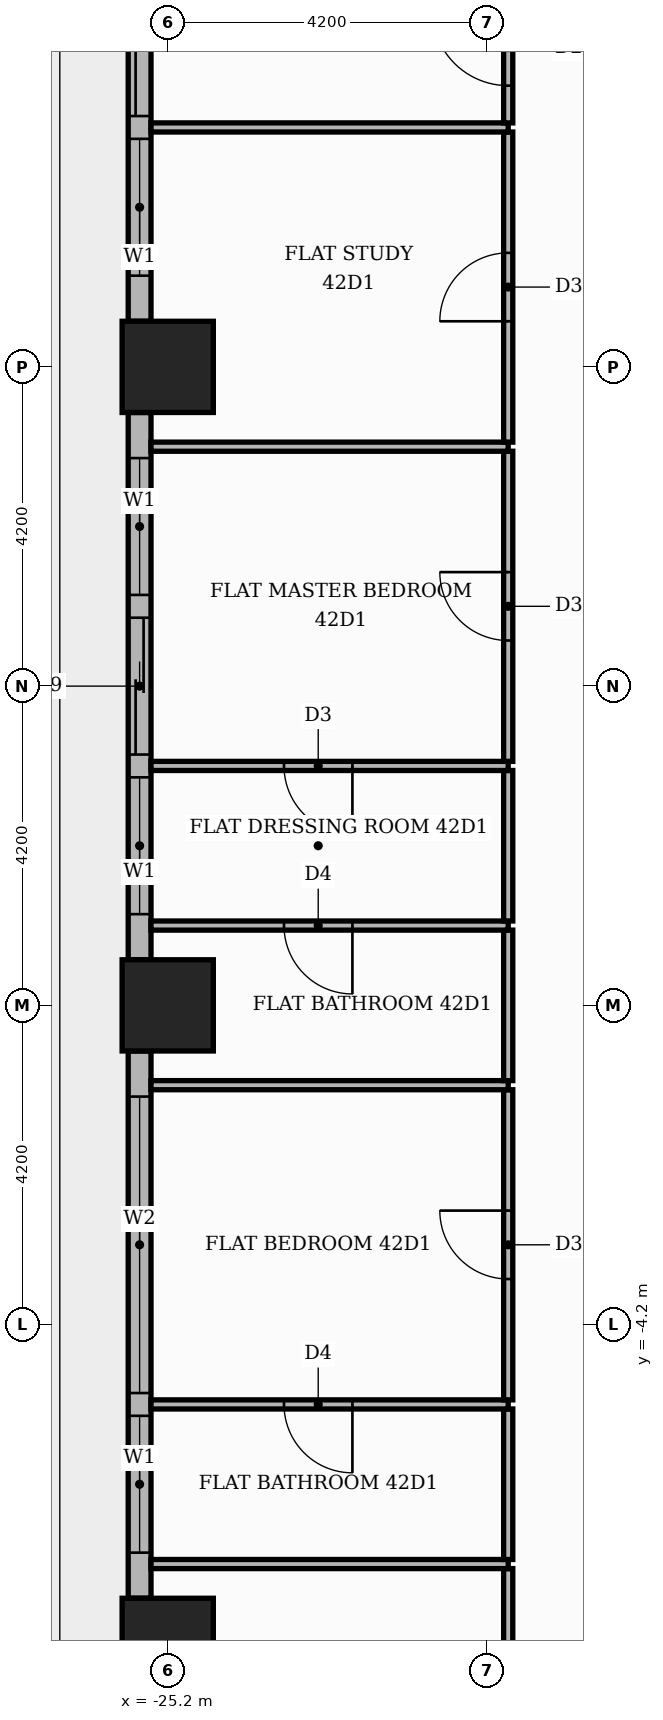
"""IFC4 building model, lengths in metres.
Left out: names, types, materials, properties, quantities, classifications, styles, units other than length and angle.
Written with IfcOpenShell. Run it as: python <this file> out.ifc"""

import sys

from ifc_helpers import new_model, si_unit, direction, frame, frame_2d, origin, origin_2d, place, context, subcontext, project, spatial, rectangle, extrude, element, fill, save


model = new_model("IFC4")
c1 = context("Model", 3, precision=1e-05, world=origin(), true_north=direction((0.0, 1.0)))
c2 = subcontext(c1, "Body", "Model", "MODEL_VIEW")
j1 = project(units=[si_unit("LENGTHUNIT", "METRE"), si_unit("PLANEANGLEUNIT", "RADIAN")], contexts=[c1])
p1 = place(None, origin())
s1 = spatial("IfcSite", under=j1, at=p1, CompositionType="ELEMENT")
p2 = place(p1, origin())
s2 = spatial("IfcBuilding", under=s1, at=p2, CompositionType="ELEMENT")
p3 = place(p2, frame((0.0, 0.0, 176.7)))
s3 = spatial("IfcBuildingStorey", under=s2, at=p3, CompositionType="ELEMENT", Elevation=176.7)
for number, where, z_axis, x_axis in (
    (1, (-25.2, 0.0, 0.0), (0.0, 0.0, 1.0), (1.0, 0.0, 0.0)),
    (2, (-25.2, -8.4, 0.0), (0.0, 0.0, 1.0), (1.0, 0.0, 0.0)),
    (3, (-25.2, 8.4, 0.0), (0.0, 0.0, 1.0), (1.0, 0.0, 0.0)),
):
    element("IfcColumn", number, at=place(p3, frame(where, z_axis=z_axis, x_axis=x_axis)), inside=s3, PredefinedType="COLUMN", context=c2, shape_type="SweptSolid", body=[
        extrude(rectangle(XDim=1.2, YDim=1.2, at=origin_2d()), origin(), (0.0, 0.0, 1.0), 3.9),
    ])
p4 = place(p3, frame((-25.57, 16.2, 0.0), z_axis=(0.0, 0.0, 1.0), x_axis=(0.0, -1.0, 0.0)))
e4 = element("IfcWall", 4, at=p4, inside=s3, PredefinedType="STANDARD", context=c2, shape_type="SweptSolid", body=[
    extrude(rectangle(XDim=7.2, YDim=0.3, at=frame_2d((3.6, 0.0))), origin(), (0.0, 0.0, 1.0), 3.4),
])
p5 = place(p4, frame((0.6, 0.0, 0.0)))
e5 = element("IfcOpeningElement", 5, at=p5, cuts=e4, PredefinedType="OPENING", context=c2, shape_type="SweptSolid", body=[
    extrude(rectangle(XDim=3.9, YDim=2.4, at=frame_2d((1.95, 1.2))), frame((0.0, 0.16, 0.0), z_axis=(0.0, -1.0, 0.0), x_axis=(1.0, 0.0, 0.0)), (0.0, 0.0, 1.0), 0.32),
])
p6 = place(p4, frame((4.8, 0.0, 0.9)))
e6 = element("IfcOpeningElement", 6, at=p6, cuts=e4, PredefinedType="OPENING", context=c2, shape_type="SweptSolid", body=[
    extrude(rectangle(XDim=1.8, YDim=2.1, at=frame_2d((0.9, 1.05))), frame((0.0, 0.16, 0.0), z_axis=(0.0, -1.0, 0.0), x_axis=(1.0, 0.0, 0.0)), (0.0, 0.0, 1.0), 0.32),
])
p7 = place(p3, frame((-25.57, 7.8, 0.0), z_axis=(0.0, 0.0, 1.0), x_axis=(0.0, -1.0, 0.0)))
e7 = element("IfcWall", 7, at=p7, inside=s3, PredefinedType="STANDARD", context=c2, shape_type="SweptSolid", body=[
    extrude(rectangle(XDim=7.2, YDim=0.3, at=frame_2d((3.6, 0.0))), origin(), (0.0, 0.0, 1.0), 3.4),
])
p8 = place(p7, frame((0.6, 0.0, 0.9)))
e8 = element("IfcOpeningElement", 8, at=p8, cuts=e7, PredefinedType="OPENING", context=c2, shape_type="SweptSolid", body=[
    extrude(rectangle(XDim=1.8, YDim=2.1, at=frame_2d((0.9, 1.05))), frame((0.0, 0.16, 0.0), z_axis=(0.0, -1.0, 0.0), x_axis=(1.0, 0.0, 0.0)), (0.0, 0.0, 1.0), 0.32),
])
p9 = place(p7, frame((2.7, 0.0, 0.0)))
e9 = element("IfcOpeningElement", 9, at=p9, cuts=e7, PredefinedType="OPENING", context=c2, shape_type="SweptSolid", body=[
    extrude(rectangle(XDim=1.8, YDim=2.4, at=frame_2d((0.9, 1.2))), frame((0.0, 0.16, 0.0), z_axis=(0.0, -1.0, 0.0), x_axis=(1.0, 0.0, 0.0)), (0.0, 0.0, 1.0), 0.32),
])
p10 = place(p7, frame((4.8, 0.0, 0.9)))
e10 = element("IfcOpeningElement", 10, at=p10, cuts=e7, PredefinedType="OPENING", context=c2, shape_type="SweptSolid", body=[
    extrude(rectangle(XDim=1.8, YDim=2.1, at=frame_2d((0.9, 1.05))), frame((0.0, 0.16, 0.0), z_axis=(0.0, -1.0, 0.0), x_axis=(1.0, 0.0, 0.0)), (0.0, 0.0, 1.0), 0.32),
])
p11 = place(p3, frame((-25.57, -0.6, 0.0), z_axis=(0.0, 0.0, 1.0), x_axis=(0.0, -1.0, 0.0)))
e11 = element("IfcWall", 11, at=p11, inside=s3, PredefinedType="STANDARD", context=c2, shape_type="SweptSolid", body=[
    extrude(rectangle(XDim=7.2, YDim=0.3, at=frame_2d((3.6, 0.0))), origin(), (0.0, 0.0, 1.0), 3.4),
])
p12 = place(p11, frame((0.6, 0.0, 0.9)))
e12 = element("IfcOpeningElement", 12, at=p12, cuts=e11, PredefinedType="OPENING", context=c2, shape_type="SweptSolid", body=[
    extrude(rectangle(XDim=3.9, YDim=2.1, at=frame_2d((1.95, 1.05))), frame((0.0, 0.16, 0.0), z_axis=(0.0, -1.0, 0.0), x_axis=(1.0, 0.0, 0.0)), (0.0, 0.0, 1.0), 0.32),
])
p13 = place(p11, frame((4.8, 0.0, 0.9)))
e13 = element("IfcOpeningElement", 13, at=p13, cuts=e11, PredefinedType="OPENING", context=c2, shape_type="SweptSolid", body=[
    extrude(rectangle(XDim=1.8, YDim=2.1, at=frame_2d((0.9, 1.05))), frame((0.0, 0.16, 0.0), z_axis=(0.0, -1.0, 0.0), x_axis=(1.0, 0.0, 0.0)), (0.0, 0.0, 1.0), 0.32),
])
p14 = place(p3, frame((-20.72, -11.49, 0.0), z_axis=(0.0, 0.0, 1.0), x_axis=(0.0, 1.0, 0.0)))
e14 = element("IfcWall", 14, at=p14, inside=s3, PredefinedType="PARTITIONING", context=c2, shape_type="SweptSolid", body=[
    extrude(rectangle(XDim=4.08, YDim=0.12, at=frame_2d((2.04, 0.0))), origin(), (0.0, 0.0, 1.0), 3.4),
])
p15 = place(p14, frame((1.59, 0.0, 0.0)))
e15 = element("IfcOpeningElement", 15, at=p15, cuts=e14, PredefinedType="OPENING", context=c2, shape_type="SweptSolid", body=[
    extrude(rectangle(XDim=0.9, YDim=2.1, at=frame_2d((0.45, 1.05))), frame((0.0, 0.07, 0.0), z_axis=(0.0, -1.0, 0.0), x_axis=(1.0, 0.0, 0.0)), (0.0, 0.0, 1.0), 0.14),
])
p16 = place(p3, frame((-25.42, -7.35, 0.0), z_axis=(0.0, 0.0, 1.0), x_axis=(1.0, 0.0, 0.0)))
e16 = element("IfcWall", 16, at=p16, inside=s3, PredefinedType="PARTITIONING", context=c2, shape_type="SweptSolid", body=[
    extrude(rectangle(XDim=4.7, YDim=0.12, at=frame_2d((2.35, 0.0))), origin(), (0.0, 0.0, 1.0), 3.4),
])
p17 = place(p3, frame((-20.72, -7.29, 0.0), z_axis=(0.0, 0.0, 1.0), x_axis=(0.0, 1.0, 0.0)))
e17 = element("IfcWall", 17, at=p17, inside=s3, PredefinedType="PARTITIONING", context=c2, shape_type="SweptSolid", body=[
    extrude(rectangle(XDim=1.98, YDim=0.12, at=frame_2d((0.99, 0.0))), origin(), (0.0, 0.0, 1.0), 3.4),
])
p18 = place(p3, frame((-25.42, -5.25, 0.0), z_axis=(0.0, 0.0, 1.0), x_axis=(1.0, 0.0, 0.0)))
e18 = element("IfcWall", 18, at=p18, inside=s3, PredefinedType="PARTITIONING", context=c2, shape_type="SweptSolid", body=[
    extrude(rectangle(XDim=4.7, YDim=0.12, at=frame_2d((2.35, 0.0))), origin(), (0.0, 0.0, 1.0), 3.4),
])
p19 = place(p18, frame((1.75, 0.0, 0.0)))
e19 = element("IfcOpeningElement", 19, at=p19, cuts=e18, PredefinedType="OPENING", context=c2, shape_type="SweptSolid", body=[
    extrude(rectangle(XDim=0.9, YDim=2.1, at=frame_2d((0.45, 1.05))), frame((0.0, 0.07, 0.0), z_axis=(0.0, -1.0, 0.0), x_axis=(1.0, 0.0, 0.0)), (0.0, 0.0, 1.0), 0.14),
])
p20 = place(p3, frame((-20.72, -5.19, 0.0), z_axis=(0.0, 0.0, 1.0), x_axis=(0.0, 1.0, 0.0)))
e20 = element("IfcWall", 20, at=p20, inside=s3, PredefinedType="PARTITIONING", context=c2, shape_type="SweptSolid", body=[
    extrude(rectangle(XDim=4.08, YDim=0.12, at=frame_2d((2.04, 0.0))), origin(), (0.0, 0.0, 1.0), 3.4),
])
p21 = place(p20, frame((1.59, 0.0, 0.0)))
e21 = element("IfcOpeningElement", 21, at=p21, cuts=e20, PredefinedType="OPENING", context=c2, shape_type="SweptSolid", body=[
    extrude(rectangle(XDim=0.9, YDim=2.1, at=frame_2d((0.45, 1.05))), frame((0.0, 0.07, 0.0), z_axis=(0.0, -1.0, 0.0), x_axis=(1.0, 0.0, 0.0)), (0.0, 0.0, 1.0), 0.14),
])
p22 = place(p3, frame((-25.42, -1.05, 0.0), z_axis=(0.0, 0.0, 1.0), x_axis=(1.0, 0.0, 0.0)))
e22 = element("IfcWall", 22, at=p22, inside=s3, PredefinedType="PARTITIONING", context=c2, shape_type="SweptSolid", body=[
    extrude(rectangle(XDim=4.7, YDim=0.12, at=frame_2d((2.35, 0.0))), origin(), (0.0, 0.0, 1.0), 3.4),
])
p23 = place(p3, frame((-20.72, -0.99, 0.0), z_axis=(0.0, 0.0, 1.0), x_axis=(0.0, 1.0, 0.0)))
e23 = element("IfcWall", 23, at=p23, inside=s3, PredefinedType="PARTITIONING", context=c2, shape_type="SweptSolid", body=[
    extrude(rectangle(XDim=1.98, YDim=0.12, at=frame_2d((0.99, 0.0))), origin(), (0.0, 0.0, 1.0), 3.4),
])
p24 = place(p3, frame((-25.42, 1.05, 0.0), z_axis=(0.0, 0.0, 1.0), x_axis=(1.0, 0.0, 0.0)))
e24 = element("IfcWall", 24, at=p24, inside=s3, PredefinedType="PARTITIONING", context=c2, shape_type="SweptSolid", body=[
    extrude(rectangle(XDim=4.7, YDim=0.12, at=frame_2d((2.35, 0.0))), origin(), (0.0, 0.0, 1.0), 3.4),
])
p25 = place(p24, frame((1.75, 0.0, 0.0)))
e25 = element("IfcOpeningElement", 25, at=p25, cuts=e24, PredefinedType="OPENING", context=c2, shape_type="SweptSolid", body=[
    extrude(rectangle(XDim=0.9, YDim=2.1, at=frame_2d((0.45, 1.05))), frame((0.0, 0.07, 0.0), z_axis=(0.0, -1.0, 0.0), x_axis=(1.0, 0.0, 0.0)), (0.0, 0.0, 1.0), 0.14),
])
p26 = place(p3, frame((-20.72, 1.11, 0.0), z_axis=(0.0, 0.0, 1.0), x_axis=(0.0, 1.0, 0.0)))
e26 = element("IfcWall", 26, at=p26, inside=s3, PredefinedType="PARTITIONING", context=c2, shape_type="SweptSolid", body=[
    extrude(rectangle(XDim=1.98, YDim=0.12, at=frame_2d((0.99, 0.0))), origin(), (0.0, 0.0, 1.0), 3.4),
])
p27 = place(p3, frame((-25.42, 3.15, 0.0), z_axis=(0.0, 0.0, 1.0), x_axis=(1.0, 0.0, 0.0)))
e27 = element("IfcWall", 27, at=p27, inside=s3, PredefinedType="PARTITIONING", context=c2, shape_type="SweptSolid", body=[
    extrude(rectangle(XDim=4.7, YDim=0.12, at=frame_2d((2.35, 0.0))), origin(), (0.0, 0.0, 1.0), 3.4),
])
p28 = place(p27, frame((1.75, 0.0, 0.0)))
e28 = element("IfcOpeningElement", 28, at=p28, cuts=e27, PredefinedType="OPENING", context=c2, shape_type="SweptSolid", body=[
    extrude(rectangle(XDim=0.9, YDim=2.1, at=frame_2d((0.45, 1.05))), frame((0.0, 0.07, 0.0), z_axis=(0.0, -1.0, 0.0), x_axis=(1.0, 0.0, 0.0)), (0.0, 0.0, 1.0), 0.14),
])
p29 = place(p3, frame((-20.72, 3.21, 0.0), z_axis=(0.0, 0.0, 1.0), x_axis=(0.0, 1.0, 0.0)))
e29 = element("IfcWall", 29, at=p29, inside=s3, PredefinedType="PARTITIONING", context=c2, shape_type="SweptSolid", body=[
    extrude(rectangle(XDim=4.08, YDim=0.12, at=frame_2d((2.04, 0.0))), origin(), (0.0, 0.0, 1.0), 3.4),
])
p30 = place(p29, frame((1.59, 0.0, 0.0)))
e30 = element("IfcOpeningElement", 30, at=p30, cuts=e29, PredefinedType="OPENING", context=c2, shape_type="SweptSolid", body=[
    extrude(rectangle(XDim=0.9, YDim=2.1, at=frame_2d((0.45, 1.05))), frame((0.0, 0.07, 0.0), z_axis=(0.0, -1.0, 0.0), x_axis=(1.0, 0.0, 0.0)), (0.0, 0.0, 1.0), 0.14),
])
p31 = place(p3, frame((-25.42, 7.35, 0.0), z_axis=(0.0, 0.0, 1.0), x_axis=(1.0, 0.0, 0.0)))
e31 = element("IfcWall", 31, at=p31, inside=s3, PredefinedType="PARTITIONING", context=c2, shape_type="SweptSolid", body=[
    extrude(rectangle(XDim=4.7, YDim=0.12, at=frame_2d((2.35, 0.0))), origin(), (0.0, 0.0, 1.0), 3.4),
])
p32 = place(p3, frame((-20.72, 7.41, 0.0), z_axis=(0.0, 0.0, 1.0), x_axis=(0.0, 1.0, 0.0)))
e32 = element("IfcWall", 32, at=p32, inside=s3, PredefinedType="PARTITIONING", context=c2, shape_type="SweptSolid", body=[
    extrude(rectangle(XDim=4.08, YDim=0.12, at=frame_2d((2.04, 0.0))), origin(), (0.0, 0.0, 1.0), 3.4),
])
p33 = place(p32, frame((1.59, 0.0, 0.0)))
e33 = element("IfcOpeningElement", 33, at=p33, cuts=e32, PredefinedType="OPENING", context=c2, shape_type="SweptSolid", body=[
    extrude(rectangle(XDim=0.9, YDim=2.1, at=frame_2d((0.45, 1.05))), frame((0.0, 0.07, 0.0), z_axis=(0.0, -1.0, 0.0), x_axis=(1.0, 0.0, 0.0)), (0.0, 0.0, 1.0), 0.14),
])
p34 = place(p3, frame((-25.42, 11.55, 0.0), z_axis=(0.0, 0.0, 1.0), x_axis=(1.0, 0.0, 0.0)))
e34 = element("IfcWall", 34, at=p34, inside=s3, PredefinedType="PARTITIONING", context=c2, shape_type="SweptSolid", body=[
    extrude(rectangle(XDim=4.7, YDim=0.12, at=frame_2d((2.35, 0.0))), origin(), (0.0, 0.0, 1.0), 3.4),
])
p35 = place(p3, frame((-20.72, 11.61, 0.0), z_axis=(0.0, 0.0, 1.0), x_axis=(0.0, 1.0, 0.0)))
e35 = element("IfcWall", 35, at=p35, inside=s3, PredefinedType="PARTITIONING", context=c2, shape_type="SweptSolid", body=[
    extrude(rectangle(XDim=1.98, YDim=0.12, at=frame_2d((0.99, 0.0))), origin(), (0.0, 0.0, 1.0), 3.4),
])
p36 = place(p35, frame((0.49, 0.0, 0.0)))
e36 = element("IfcOpeningElement", 36, at=p36, cuts=e35, PredefinedType="OPENING", context=c2, shape_type="SweptSolid", body=[
    extrude(rectangle(XDim=1.0, YDim=2.1, at=frame_2d((0.5, 1.05))), frame((0.0, 0.07, 0.0), z_axis=(0.0, -1.0, 0.0), x_axis=(1.0, 0.0, 0.0)), (0.0, 0.0, 1.0), 0.14),
])
p37 = place(p5, origin())
e37 = element("IfcDoor", 37, at=p37, inside=s3, OperationType="SLIDING_TO_LEFT", PredefinedType="DOOR", context=c2, shape_type="SweptSolid", body=[
    extrude(rectangle(XDim=3.9, YDim=2.4, at=frame_2d((1.95, 1.2))), frame((0.0, 0.025, 0.0), z_axis=(0.0, -1.0, 0.0), x_axis=(1.0, 0.0, 0.0)), (0.0, 0.0, 1.0), 0.05),
])
fill(e5, e37)
p38 = place(p6, origin())
e38 = element("IfcWindow", 38, at=p38, inside=s3, PartitioningType="SINGLE_PANEL", PredefinedType="WINDOW", context=c2, shape_type="SweptSolid", body=[
    extrude(rectangle(XDim=1.8, YDim=2.1, at=frame_2d((0.9, 1.05))), frame((0.0, 0.03, 0.0), z_axis=(0.0, -1.0, 0.0), x_axis=(1.0, 0.0, 0.0)), (0.0, 0.0, 1.0), 0.06),
])
fill(e6, e38)
p39 = place(p8, origin())
e39 = element("IfcWindow", 39, at=p39, inside=s3, PartitioningType="SINGLE_PANEL", PredefinedType="WINDOW", context=c2, shape_type="SweptSolid", body=[
    extrude(rectangle(XDim=1.8, YDim=2.1, at=frame_2d((0.9, 1.05))), frame((0.0, 0.03, 0.0), z_axis=(0.0, -1.0, 0.0), x_axis=(1.0, 0.0, 0.0)), (0.0, 0.0, 1.0), 0.06),
])
fill(e8, e39)
p40 = place(p9, origin())
e40 = element("IfcDoor", 40, at=p40, inside=s3, OperationType="SLIDING_TO_LEFT", PredefinedType="DOOR", context=c2, shape_type="SweptSolid", body=[
    extrude(rectangle(XDim=1.8, YDim=2.4, at=frame_2d((0.9, 1.2))), frame((0.0, 0.025, 0.0), z_axis=(0.0, -1.0, 0.0), x_axis=(1.0, 0.0, 0.0)), (0.0, 0.0, 1.0), 0.05),
])
fill(e9, e40)
p41 = place(p10, origin())
e41 = element("IfcWindow", 41, at=p41, inside=s3, PartitioningType="SINGLE_PANEL", PredefinedType="WINDOW", context=c2, shape_type="SweptSolid", body=[
    extrude(rectangle(XDim=1.8, YDim=2.1, at=frame_2d((0.9, 1.05))), frame((0.0, 0.03, 0.0), z_axis=(0.0, -1.0, 0.0), x_axis=(1.0, 0.0, 0.0)), (0.0, 0.0, 1.0), 0.06),
])
fill(e10, e41)
p42 = place(p12, origin())
e42 = element("IfcWindow", 42, at=p42, inside=s3, PartitioningType="SINGLE_PANEL", PredefinedType="WINDOW", context=c2, shape_type="SweptSolid", body=[
    extrude(rectangle(XDim=3.9, YDim=2.1, at=frame_2d((1.95, 1.05))), frame((0.0, 0.03, 0.0), z_axis=(0.0, -1.0, 0.0), x_axis=(1.0, 0.0, 0.0)), (0.0, 0.0, 1.0), 0.06),
])
fill(e12, e42)
p43 = place(p13, origin())
e43 = element("IfcWindow", 43, at=p43, inside=s3, PartitioningType="SINGLE_PANEL", PredefinedType="WINDOW", context=c2, shape_type="SweptSolid", body=[
    extrude(rectangle(XDim=1.8, YDim=2.1, at=frame_2d((0.9, 1.05))), frame((0.0, 0.03, 0.0), z_axis=(0.0, -1.0, 0.0), x_axis=(1.0, 0.0, 0.0)), (0.0, 0.0, 1.0), 0.06),
])
fill(e13, e43)
p44 = place(p36, origin())
e44 = element("IfcDoor", 44, at=p44, inside=s3, OperationType="SINGLE_SWING_RIGHT", PredefinedType="DOOR", context=c2, shape_type="SweptSolid", body=[
    extrude(rectangle(XDim=1.0, YDim=2.1, at=frame_2d((0.5, 1.05))), frame((0.0, 0.025, 0.0), z_axis=(0.0, -1.0, 0.0), x_axis=(1.0, 0.0, 0.0)), (0.0, 0.0, 1.0), 0.05),
])
fill(e36, e44)
p45 = place(p33, origin())
e45 = element("IfcDoor", 45, at=p45, inside=s3, OperationType="SINGLE_SWING_LEFT", PredefinedType="DOOR", context=c2, shape_type="SweptSolid", body=[
    extrude(rectangle(XDim=0.9, YDim=2.1, at=frame_2d((0.45, 1.05))), frame((0.0, 0.025, 0.0), z_axis=(0.0, -1.0, 0.0), x_axis=(1.0, 0.0, 0.0)), (0.0, 0.0, 1.0), 0.05),
])
fill(e33, e45)
p46 = place(p30, origin())
e46 = element("IfcDoor", 46, at=p46, inside=s3, OperationType="SINGLE_SWING_RIGHT", PredefinedType="DOOR", context=c2, shape_type="SweptSolid", body=[
    extrude(rectangle(XDim=0.9, YDim=2.1, at=frame_2d((0.45, 1.05))), frame((0.0, 0.025, 0.0), z_axis=(0.0, -1.0, 0.0), x_axis=(1.0, 0.0, 0.0)), (0.0, 0.0, 1.0), 0.05),
])
fill(e30, e46)
p47 = place(p28, frame((0.9, 0.0, 0.0), z_axis=(0.0, 0.0, 1.0), x_axis=(-1.0, 0.0, 0.0)))
e47 = element("IfcDoor", 47, at=p47, inside=s3, OperationType="SINGLE_SWING_RIGHT", PredefinedType="DOOR", context=c2, shape_type="SweptSolid", body=[
    extrude(rectangle(XDim=0.9, YDim=2.1, at=frame_2d((0.45, 1.05))), frame((0.0, 0.025, 0.0), z_axis=(0.0, -1.0, 0.0), x_axis=(1.0, 0.0, 0.0)), (0.0, 0.0, 1.0), 0.05),
])
fill(e28, e47)
p48 = place(p25, frame((0.9, 0.0, 0.0), z_axis=(0.0, 0.0, 1.0), x_axis=(-1.0, 0.0, 0.0)))
e48 = element("IfcDoor", 48, at=p48, inside=s3, OperationType="SINGLE_SWING_RIGHT", PredefinedType="DOOR", context=c2, shape_type="SweptSolid", body=[
    extrude(rectangle(XDim=0.9, YDim=2.1, at=frame_2d((0.45, 1.05))), frame((0.0, 0.025, 0.0), z_axis=(0.0, -1.0, 0.0), x_axis=(1.0, 0.0, 0.0)), (0.0, 0.0, 1.0), 0.05),
])
fill(e25, e48)
p49 = place(p21, origin())
e49 = element("IfcDoor", 49, at=p49, inside=s3, OperationType="SINGLE_SWING_RIGHT", PredefinedType="DOOR", context=c2, shape_type="SweptSolid", body=[
    extrude(rectangle(XDim=0.9, YDim=2.1, at=frame_2d((0.45, 1.05))), frame((0.0, 0.025, 0.0), z_axis=(0.0, -1.0, 0.0), x_axis=(1.0, 0.0, 0.0)), (0.0, 0.0, 1.0), 0.05),
])
fill(e21, e49)
p50 = place(p19, frame((0.9, 0.0, 0.0), z_axis=(0.0, 0.0, 1.0), x_axis=(-1.0, 0.0, 0.0)))
e50 = element("IfcDoor", 50, at=p50, inside=s3, OperationType="SINGLE_SWING_RIGHT", PredefinedType="DOOR", context=c2, shape_type="SweptSolid", body=[
    extrude(rectangle(XDim=0.9, YDim=2.1, at=frame_2d((0.45, 1.05))), frame((0.0, 0.025, 0.0), z_axis=(0.0, -1.0, 0.0), x_axis=(1.0, 0.0, 0.0)), (0.0, 0.0, 1.0), 0.05),
])
fill(e19, e50)
save(model, sys.argv[1])
